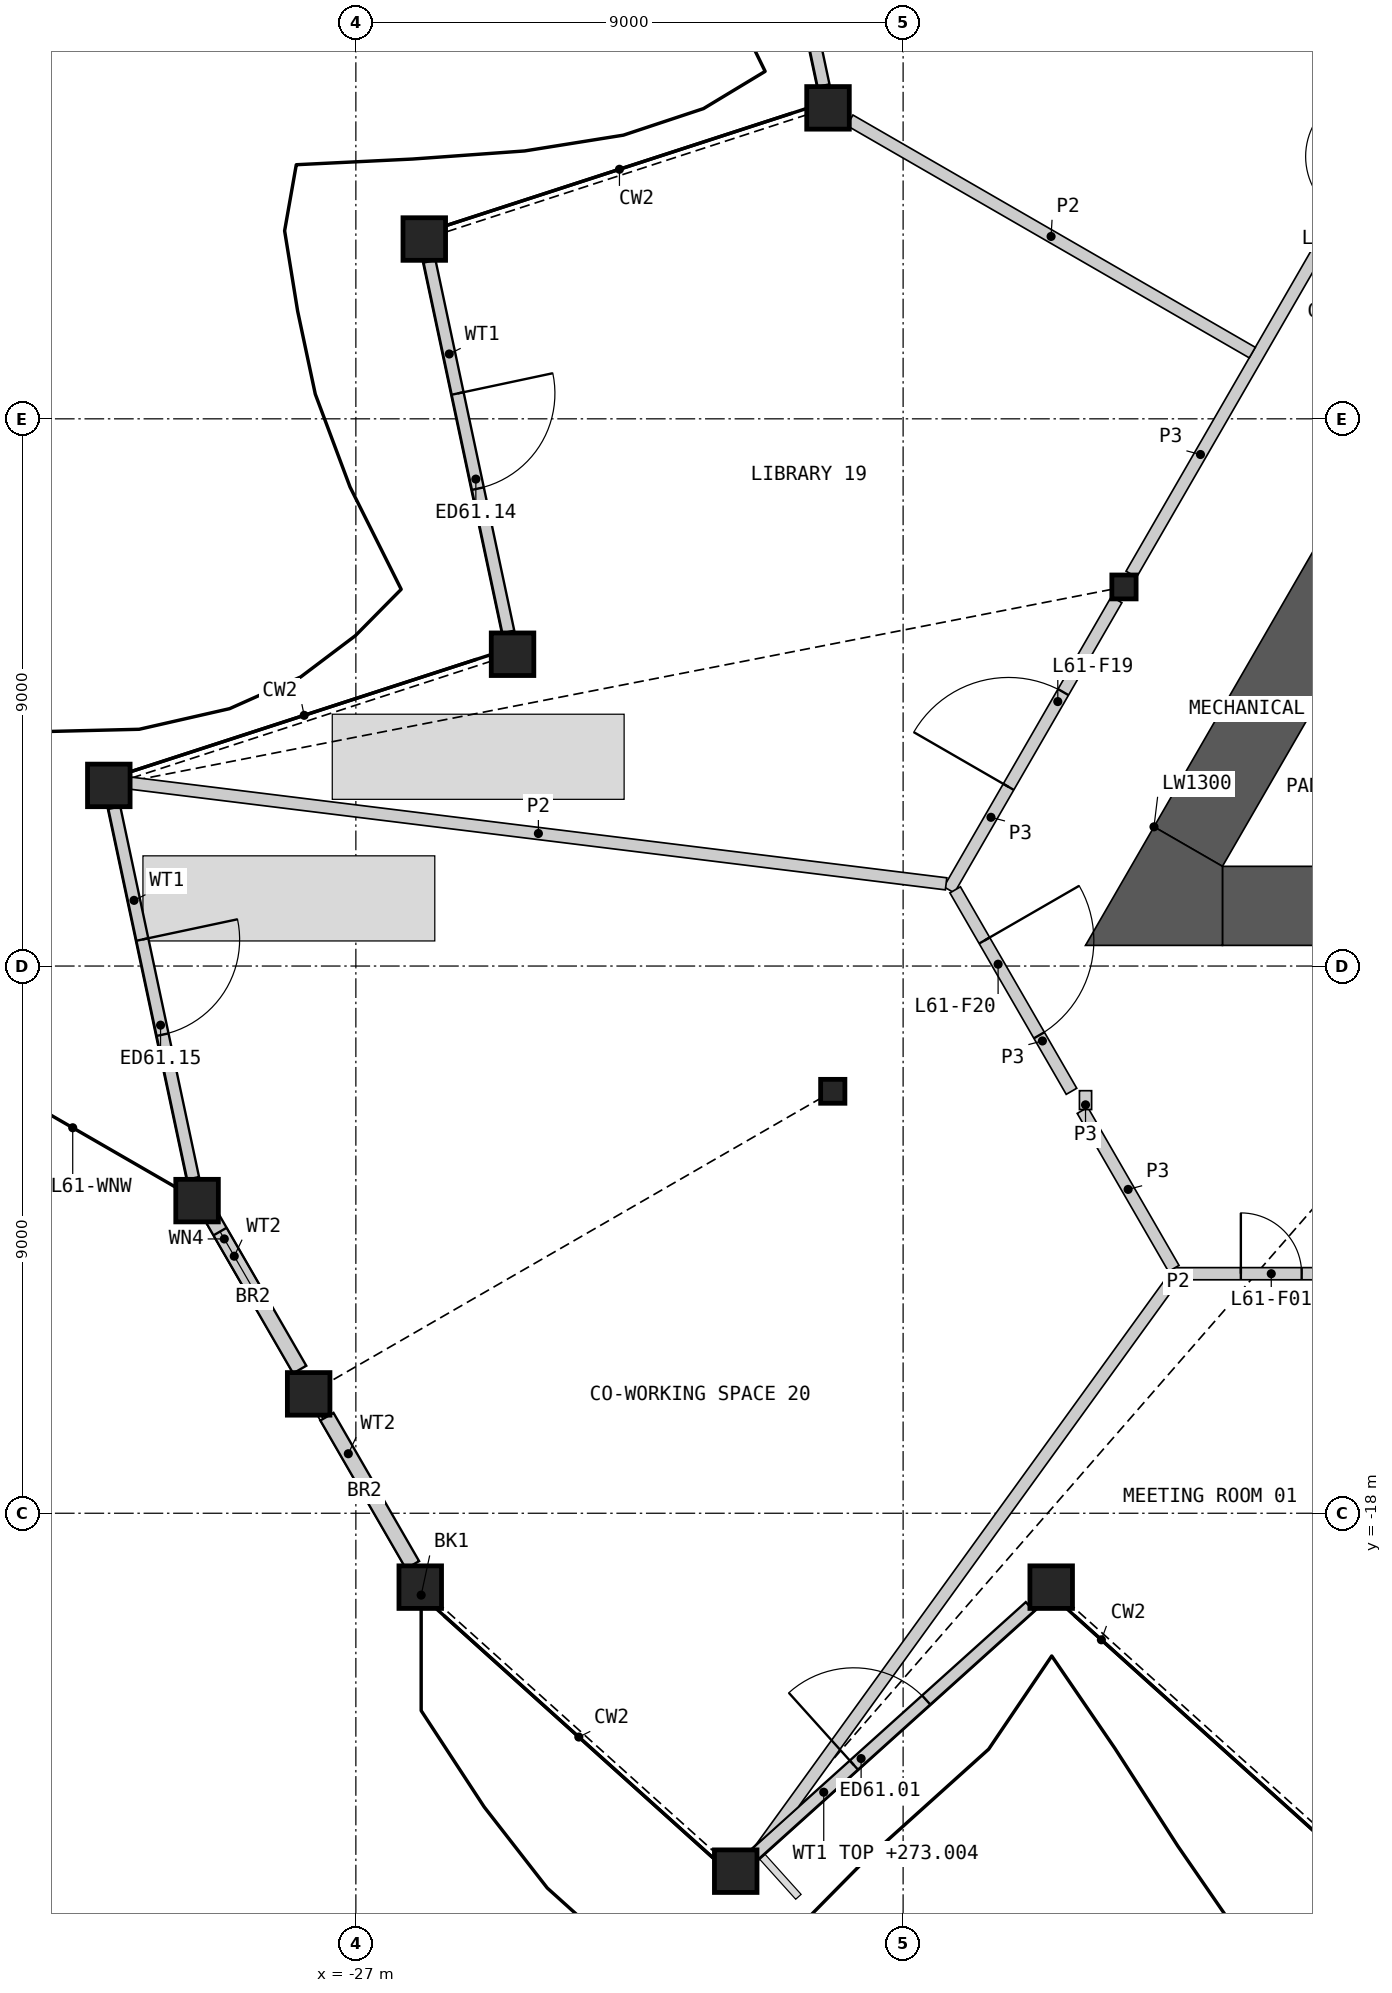
"""IFC4 building model, lengths in metres.
Left out: names, types, materials, properties, quantities, classifications, styles, units other than length and angle.
Written with IfcOpenShell. Run it as: python <this file> out.ifc"""

import sys

from ifc_helpers import new_model, si_unit, direction, frame, frame_2d, origin, origin_2d, place, context, subcontext, project, spatial, polyline, rectangle, hollow_rectangle, i_section, outline, extrude, element, fill, save


model = new_model("IFC4")
c1 = context("Model", 3, precision=1e-05, world=origin(), true_north=direction((0.0, 1.0)))
c2 = subcontext(c1, "Body", "Model", "MODEL_VIEW")
j1 = project(units=[si_unit("LENGTHUNIT", "METRE"), si_unit("PLANEANGLEUNIT", "RADIAN")], contexts=[c1])
p1 = place(None, origin())
s1 = spatial("IfcSite", under=j1, at=p1, CompositionType="ELEMENT")
p2 = place(p1, origin())
s2 = spatial("IfcBuilding", under=s1, at=p2, CompositionType="ELEMENT")
p3 = place(p2, frame((0.0, 0.0, 270.6)))
s3 = spatial("IfcBuildingStorey", under=s2, at=p3, CompositionType="ELEMENT", Elevation=270.6)
for number, where, z_axis, x_axis in (
    (1, (-25.941, -19.215, 0.0), (0.0, 0.0, 1.0), (1.0, 0.0, 0.0)),
    (2, (-20.753, -23.887, 0.0), (0.0, 0.0, 1.0), (1.0, 0.0, 0.0)),
    (3, (-15.565, -19.215, 0.0), (0.0, 0.0, 1.0), (1.0, 0.0, 0.0)),
    (4, (-19.235, 5.115, 0.0), (0.0, 0.0, 1.0), (1.0, 0.0, 0.0)),
    (5, (-25.875, 2.957, 0.0), (0.0, 0.0, 1.0), (1.0, 0.0, 0.0)),
    (6, (-24.423, -3.872, 0.0), (0.0, 0.0, 1.0), (1.0, 0.0, 0.0)),
    (7, (-31.063, -6.029, 0.0), (0.0, 0.0, 1.0), (1.0, 0.0, 0.0)),
    (8, (-29.612, -12.858, 0.0), (0.0, 0.0, 1.0), (1.0, 0.0, 0.0)),
    (9, (-27.776, -16.037, 0.0), (0.0, 0.0, 1.0), (1.0, 0.0, 0.0)),
):
    element("IfcColumn", number, at=place(p3, frame(where, z_axis=z_axis, x_axis=x_axis)), inside=s3, PredefinedType="COLUMN", context=c2, shape_type="SweptSolid", body=[
        extrude(hollow_rectangle(XDim=0.7, YDim=0.7, WallThickness=0.045, at=origin_2d()), origin(), (0.0, 0.0, 1.0), 3.6),
    ])
for number, where, z_axis, x_axis in (
    (10, (-14.368, -2.765, 0.0), (0.0, 0.0, 1.0), (1.0, 0.0, 0.0)),
    (11, (-19.157, -11.06, 0.0), (0.0, 0.0, 1.0), (1.0, 0.0, 0.0)),
):
    element("IfcColumn", number, at=place(p3, frame(where, z_axis=z_axis, x_axis=x_axis)), inside=s3, PredefinedType="COLUMN", context=c2, shape_type="SweptSolid", body=[
        extrude(i_section(OverallWidth=0.399, OverallDepth=0.393, WebThickness=0.023, FlangeThickness=0.037, at=origin_2d()), origin(), (0.0, 0.0, 1.0), 3.6),
    ])
p4 = place(p3, frame((-20.436, -23.606, 0.0), z_axis=(0.0, 0.0, 1.0), x_axis=(0.743162414049, 0.669111071755, 0.0)))
e12 = element("IfcWall", 12, at=p4, inside=s3, PredefinedType="SOLIDWALL", context=c2, shape_type="SweptSolid", body=[
    extrude(rectangle(XDim=6.083, YDim=0.2, at=frame_2d((3.042, 0.0))), origin(), (0.0, 0.0, 1.0), 2.404),
])
p5 = place(p4, frame((2.188, 0.0, 0.0)))
e13 = element("IfcOpeningElement", 13, at=p5, cuts=e12, PredefinedType="OPENING", context=c2, shape_type="SweptSolid", body=[
    extrude(rectangle(XDim=1.6, YDim=2.4, at=frame_2d((0.8, 1.2))), frame((0.0, 0.11, 0.0), z_axis=(0.0, -1.0, 0.0), x_axis=(1.0, 0.0, 0.0)), (0.0, 0.0, 1.0), 0.22),
])
p6 = place(p3, frame((-20.604, 11.577, 0.0), z_axis=(0.0, 0.0, 1.0), x_axis=(0.207907484076, -0.978148494895, 0.0)))
e14 = element("IfcWall", 14, at=p6, inside=s3, PredefinedType="SOLIDWALL", context=c2, shape_type="SweptSolid", body=[
    extrude(rectangle(XDim=6.232, YDim=0.2, at=frame_2d((3.116, 0.0))), origin(), (0.0, 0.0, 1.0), 2.701),
])
p7 = place(p6, frame((2.227, 0.0, 0.0)))
e15 = element("IfcOpeningElement", 15, at=p7, cuts=e14, PredefinedType="OPENING", context=c2, shape_type="SweptSolid", body=[
    extrude(rectangle(XDim=1.6, YDim=2.4, at=frame_2d((0.8, 1.2))), frame((0.0, 0.11, 0.0), z_axis=(0.0, -1.0, 0.0), x_axis=(1.0, 0.0, 0.0)), (0.0, 0.0, 1.0), 0.22),
])
p8 = place(p3, frame((-25.788, 2.591, 0.0), z_axis=(0.0, 0.0, 1.0), x_axis=(0.207907484076, -0.978148494895, 0.0)))
e16 = element("IfcWall", 16, at=p8, inside=s3, PredefinedType="SOLIDWALL", context=c2, shape_type="SweptSolid", body=[
    extrude(rectangle(XDim=6.232, YDim=0.2, at=frame_2d((3.116, 0.0))), origin(), (0.0, 0.0, 1.0), 2.701),
])
p9 = place(p8, frame((2.222, 0.0, 0.0)))
e17 = element("IfcOpeningElement", 17, at=p9, cuts=e16, PredefinedType="OPENING", context=c2, shape_type="SweptSolid", body=[
    extrude(rectangle(XDim=1.6, YDim=2.4, at=frame_2d((0.8, 1.2))), frame((0.0, 0.11, 0.0), z_axis=(0.0, -1.0, 0.0), x_axis=(1.0, 0.0, 0.0)), (0.0, 0.0, 1.0), 0.22),
])
p10 = place(p3, frame((-30.972, -6.396, 0.0), z_axis=(0.0, 0.0, 1.0), x_axis=(0.207907484076, -0.978148494895, 0.0)))
e18 = element("IfcWall", 18, at=p10, inside=s3, PredefinedType="SOLIDWALL", context=c2, shape_type="SweptSolid", body=[
    extrude(rectangle(XDim=6.232, YDim=0.2, at=frame_2d((3.116, 0.0))), origin(), (0.0, 0.0, 1.0), 2.701),
])
p11 = place(p10, frame((2.216, 0.0, 0.0)))
e19 = element("IfcOpeningElement", 19, at=p11, cuts=e18, PredefinedType="OPENING", context=c2, shape_type="SweptSolid", body=[
    extrude(rectangle(XDim=1.6, YDim=2.4, at=frame_2d((0.8, 1.2))), frame((0.0, 0.11, 0.0), z_axis=(0.0, -1.0, 0.0), x_axis=(1.0, 0.0, 0.0)), (0.0, 0.0, 1.0), 0.22),
])
p12 = place(p3, frame((-29.359, -13.151, 0.0), z_axis=(0.0, 0.0, 1.0), x_axis=(0.499989935246, -0.866031214595, 0.0)))
e20 = element("IfcWall", 20, at=p12, inside=s3, PredefinedType="SOLIDWALL", context=c2, shape_type="SweptSolid", body=[
    extrude(rectangle(XDim=2.871, YDim=0.25, at=frame_2d((1.435, 0.0))), origin(), (0.0, 0.0, 1.0), 2.701),
])
p13 = place(p12, frame((0.25, 0.0, 1.8)))
e21 = element("IfcOpeningElement", 21, at=p13, cuts=e20, PredefinedType="OPENING", context=c2, shape_type="SweptSolid", body=[
    extrude(rectangle(XDim=1.4, YDim=0.7, at=frame_2d((0.7, 0.35))), frame((0.0, 0.135, 0.0), z_axis=(0.0, -1.0, 0.0), x_axis=(1.0, 0.0, 0.0)), (0.0, 0.0, 1.0), 0.27),
])
p14 = place(p3, frame((-27.476, -16.412, 0.0), z_axis=(0.0, 0.0, 1.0), x_axis=(0.49996263964, -0.866046972724, 0.0)))
e22 = element("IfcWall", 22, at=p14, inside=s3, PredefinedType="SOLIDWALL", context=c2, shape_type="SweptSolid", body=[
    extrude(rectangle(XDim=2.816, YDim=0.25, at=frame_2d((1.408, 0.0))), origin(), (0.0, 0.0, 1.0), 2.701),
])
p15 = place(p3, frame((-12.748, -8.01, 0.0), z_axis=(0.0, 0.0, 1.0), x_axis=(1.0, 0.0, 0.0)))
e23 = element("IfcWall", 23, at=p15, inside=s3, PredefinedType="SHEAR", context=c2, shape_type="SweptSolid", body=[
    extrude(rectangle(XDim=4.26, YDim=1.3, at=frame_2d((2.13, 0.0))), origin(), (0.0, 0.0, 1.0), 3.25),
])
p16 = place(p3, frame((-10.338, -1.885, 0.0), z_axis=(0.0, 0.0, 1.0), x_axis=(-0.499975944838, -0.866039291593, 0.0)))
e24 = element("IfcWall", 24, at=p16, inside=s3, PredefinedType="SHEAR", context=c2, shape_type="SweptSolid", body=[
    extrude(rectangle(XDim=5.947, YDim=1.3, at=frame_2d((2.974, 0.0))), origin(), (0.0, 0.0, 1.0), 3.25),
])
p17 = place(p3, origin())
e25 = element("IfcWall", 25, at=p17, inside=s3, PredefinedType="SHEAR", context=c2, shape_type="SweptSolid", body=[
    extrude(outline(polyline([(-13.874, -6.71), (-12.748, -7.36), (-12.748, -8.66), (-15.0, -8.66), (-13.874, -6.71)])), origin(), (0.0, 0.0, 1.0), 3.25),
])
p18 = place(p3, frame((-13.599, -14.06, 0.0), z_axis=(0.0, 0.0, 1.0), x_axis=(1.0, 0.0, 0.0)))
e26 = element("IfcWall", 26, at=p18, inside=s3, PredefinedType="PARTITIONING", context=c2, shape_type="SweptSolid", body=[
    extrude(rectangle(XDim=27.198, YDim=0.2, at=frame_2d((13.599, 0.0))), origin(), (0.0, 0.0, 1.0), 3.25),
])
p19 = place(p18, frame((1.153, 0.0, 0.0)))
e27 = element("IfcOpeningElement", 27, at=p19, cuts=e26, PredefinedType="OPENING", context=c2, shape_type="SweptSolid", body=[
    extrude(rectangle(XDim=1.0, YDim=2.1, at=frame_2d((0.5, 1.05))), frame((0.0, 0.11, 0.0), z_axis=(0.0, -1.0, 0.0), x_axis=(1.0, 0.0, 0.0)), (0.0, 0.0, 1.0), 0.22),
])
p20 = place(p18, frame((7.478, 0.0, 0.0)))
e28 = element("IfcOpeningElement", 28, at=p20, cuts=e26, PredefinedType="OPENING", context=c2, shape_type="SweptSolid", body=[
    extrude(rectangle(XDim=1.8, YDim=2.1, at=frame_2d((0.9, 1.05))), frame((0.0, 0.11, 0.0), z_axis=(0.0, -1.0, 0.0), x_axis=(1.0, 0.0, 0.0)), (0.0, 0.0, 1.0), 0.22),
])
p21 = place(p18, frame((17.516, 0.0, 0.0)))
e29 = element("IfcOpeningElement", 29, at=p21, cuts=e26, PredefinedType="OPENING", context=c2, shape_type="SweptSolid", body=[
    extrude(rectangle(XDim=1.0, YDim=2.1, at=frame_2d((0.5, 1.05))), frame((0.0, 0.11, 0.0), z_axis=(0.0, -1.0, 0.0), x_axis=(1.0, 0.0, 0.0)), (0.0, 0.0, 1.0), 0.22),
])
p22 = place(p18, frame((22.036, 0.0, 0.0)))
e30 = element("IfcOpeningElement", 30, at=p22, cuts=e26, PredefinedType="OPENING", context=c2, shape_type="SweptSolid", body=[
    extrude(rectangle(XDim=1.8, YDim=2.1, at=frame_2d((0.9, 1.05))), frame((0.0, 0.11, 0.0), z_axis=(0.0, -1.0, 0.0), x_axis=(1.0, 0.0, 0.0)), (0.0, 0.0, 1.0), 0.22),
])
p23 = place(p3, frame((-14.247, -2.556, 0.0), z_axis=(0.0, 0.0, 1.0), x_axis=(0.49998193945, 0.866035830797, 0.0)))
e31 = element("IfcWall", 31, at=p23, inside=s3, PredefinedType="PARTITIONING", context=c2, shape_type="SweptSolid", body=[
    extrude(rectangle(XDim=9.094, YDim=0.2, at=frame_2d((4.547, 0.0))), origin(), (0.0, 0.0, 1.0), 3.25),
])
p24 = place(p23, frame((6.833, 0.0, 0.0)))
e32 = element("IfcOpeningElement", 32, at=p24, cuts=e31, PredefinedType="OPENING", context=c2, shape_type="SweptSolid", body=[
    extrude(rectangle(XDim=1.1, YDim=2.1, at=frame_2d((0.55, 1.05))), frame((0.0, 0.11, 0.0), z_axis=(0.0, -1.0, 0.0), x_axis=(1.0, 0.0, 0.0)), (0.0, 0.0, 1.0), 0.22),
])
p25 = place(p3, frame((-17.244, -7.747, 0.0), z_axis=(0.0, 0.0, 1.0), x_axis=(0.500017753321, 0.866015153657, 0.0)))
e33 = element("IfcWall", 33, at=p25, inside=s3, PredefinedType="PARTITIONING", context=c2, shape_type="SweptSolid", body=[
    extrude(rectangle(XDim=5.51, YDim=0.2, at=frame_2d((2.755, 0.0))), origin(), (0.0, 0.0, 1.0), 3.25),
])
p26 = place(p25, frame((1.956, 0.0, 0.0)))
e34 = element("IfcOpeningElement", 34, at=p26, cuts=e33, PredefinedType="OPENING", context=c2, shape_type="SweptSolid", body=[
    extrude(rectangle(XDim=1.8, YDim=2.1, at=frame_2d((0.9, 1.05))), frame((0.0, 0.11, 0.0), z_axis=(0.0, -1.0, 0.0), x_axis=(1.0, 0.0, 0.0)), (0.0, 0.0, 1.0), 0.22),
])
p27 = place(p3, frame((-17.144, -7.747, 0.0), z_axis=(0.0, 0.0, 1.0), x_axis=(0.499961815444, -0.866047448526, 0.0)))
e35 = element("IfcWall", 35, at=p27, inside=s3, PredefinedType="PARTITIONING", context=c2, shape_type="SweptSolid", body=[
    extrude(rectangle(XDim=3.826, YDim=0.2, at=frame_2d((1.913, 0.0))), origin(), (0.0, 0.0, 1.0), 3.25),
])
p28 = place(p27, frame((0.962, 0.0, 0.0)))
e36 = element("IfcOpeningElement", 36, at=p28, cuts=e35, PredefinedType="OPENING", context=c2, shape_type="SweptSolid", body=[
    extrude(rectangle(XDim=1.8, YDim=2.1, at=frame_2d((0.9, 1.05))), frame((0.0, 0.11, 0.0), z_axis=(0.0, -1.0, 0.0), x_axis=(1.0, 0.0, 0.0)), (0.0, 0.0, 1.0), 0.22),
])
p29 = place(p3, frame((-15.05, -11.374, 0.0), z_axis=(0.0, 0.0, 1.0), x_axis=(0.500048608389, -0.865997337899, 0.0)))
e37 = element("IfcWall", 37, at=p29, inside=s3, PredefinedType="PARTITIONING", context=c2, shape_type="SweptSolid", body=[
    extrude(rectangle(XDim=3.002, YDim=0.2, at=frame_2d((1.501, 0.0))), origin(), (0.0, 0.0, 1.0), 3.25),
])
p30 = place(p3, frame((-15.0, -11.36, 0.0), z_axis=(0.0, 0.0, 1.0), x_axis=(0.0, 1.0, 0.0)))
e38 = element("IfcWall", 38, at=p30, inside=s3, PredefinedType="PARTITIONING", context=c2, shape_type="SweptSolid", body=[
    extrude(rectangle(XDim=0.31, YDim=0.2, at=frame_2d((0.155, 0.0))), origin(), (0.0, 0.0, 1.0), 3.25),
])
p31 = place(p3, frame((-30.703, -5.992, 0.0), z_axis=(0.0, 0.0, 1.0), x_axis=(0.992463280008, -0.122542391993, 0.0)))
e39 = element("IfcWall", 39, at=p31, inside=s3, PredefinedType="PARTITIONING", context=c2, shape_type="SweptSolid", body=[
    extrude(rectangle(XDim=13.512, YDim=0.2, at=frame_2d((6.756, 0.0))), origin(), (0.0, 0.0, 1.0), 2.404),
])
p32 = place(p3, origin())
e40 = element("IfcWall", 40, at=p32, inside=s3, PredefinedType="PARTITIONING", context=c2, shape_type="SweptSolid", body=[
    extrude(outline(polyline([(-13.476, -14.2), (-19.723, -22.83), (-20.432, -23.468), (-13.638, -14.083), (-13.476, -14.2)])), origin(), (0.0, 0.0, 1.0), 2.404),
])
p33 = place(p3, frame((-18.875, 4.91, 0.0), z_axis=(0.0, 0.0, 1.0), x_axis=(0.866018509426, -0.50001194119, 0.0)))
e41 = element("IfcWall", 41, at=p33, inside=s3, PredefinedType="PARTITIONING", context=c2, shape_type="SweptSolid", body=[
    extrude(rectangle(XDim=7.641, YDim=0.2, at=frame_2d((3.82, 0.0))), origin(), (0.0, 0.0, 1.0), 2.404),
])
p34 = place(p5, origin())
e42 = element("IfcDoor", 42, at=p34, inside=s3, OperationType="DOUBLE_DOOR_SINGLE_SWING", PredefinedType="DOOR", context=c2, shape_type="SweptSolid", body=[
    extrude(rectangle(XDim=1.6, YDim=2.4, at=frame_2d((0.8, 1.2))), frame((0.0, 0.025, 0.0), z_axis=(0.0, -1.0, 0.0), x_axis=(1.0, 0.0, 0.0)), (0.0, 0.0, 1.0), 0.05),
])
fill(e13, e42)
p35 = place(p9, origin())
e43 = element("IfcDoor", 43, at=p35, inside=s3, OperationType="DOUBLE_DOOR_SINGLE_SWING", PredefinedType="DOOR", context=c2, shape_type="SweptSolid", body=[
    extrude(rectangle(XDim=1.6, YDim=2.4, at=frame_2d((0.8, 1.2))), frame((0.0, 0.025, 0.0), z_axis=(0.0, -1.0, 0.0), x_axis=(1.0, 0.0, 0.0)), (0.0, 0.0, 1.0), 0.05),
])
fill(e17, e43)
p36 = place(p11, origin())
e44 = element("IfcDoor", 44, at=p36, inside=s3, OperationType="DOUBLE_DOOR_SINGLE_SWING", PredefinedType="DOOR", context=c2, shape_type="SweptSolid", body=[
    extrude(rectangle(XDim=1.6, YDim=2.4, at=frame_2d((0.8, 1.2))), frame((0.0, 0.025, 0.0), z_axis=(0.0, -1.0, 0.0), x_axis=(1.0, 0.0, 0.0)), (0.0, 0.0, 1.0), 0.05),
])
fill(e19, e44)
p37 = place(p13, origin())
e45 = element("IfcWindow", 45, at=p37, inside=s3, PartitioningType="SINGLE_PANEL", PredefinedType="WINDOW", context=c2, shape_type="SweptSolid", body=[
    extrude(rectangle(XDim=1.4, YDim=0.7, at=frame_2d((0.7, 0.35))), frame((0.0, 0.03, 0.0), z_axis=(0.0, -1.0, 0.0), x_axis=(1.0, 0.0, 0.0)), (0.0, 0.0, 1.0), 0.06),
])
fill(e21, e45)
p38 = place(p19, origin())
e46 = element("IfcDoor", 46, at=p38, inside=s3, OperationType="SINGLE_SWING_LEFT", PredefinedType="DOOR", context=c2, shape_type="SweptSolid", body=[
    extrude(rectangle(XDim=1.0, YDim=2.1, at=frame_2d((0.5, 1.05))), frame((0.0, 0.025, 0.0), z_axis=(0.0, -1.0, 0.0), x_axis=(1.0, 0.0, 0.0)), (0.0, 0.0, 1.0), 0.05),
])
fill(e27, e46)
p39 = place(p26, origin())
e47 = element("IfcDoor", 47, at=p39, inside=s3, OperationType="DOUBLE_DOOR_SINGLE_SWING", PredefinedType="DOOR", context=c2, shape_type="SweptSolid", body=[
    extrude(rectangle(XDim=1.8, YDim=2.1, at=frame_2d((0.9, 1.05))), frame((0.0, 0.025, 0.0), z_axis=(0.0, -1.0, 0.0), x_axis=(1.0, 0.0, 0.0)), (0.0, 0.0, 1.0), 0.05),
])
fill(e34, e47)
p40 = place(p28, origin())
e48 = element("IfcDoor", 48, at=p40, inside=s3, OperationType="DOUBLE_DOOR_SINGLE_SWING", PredefinedType="DOOR", context=c2, shape_type="SweptSolid", body=[
    extrude(rectangle(XDim=1.8, YDim=2.1, at=frame_2d((0.9, 1.05))), frame((0.0, 0.025, 0.0), z_axis=(0.0, -1.0, 0.0), x_axis=(1.0, 0.0, 0.0)), (0.0, 0.0, 1.0), 0.05),
])
fill(e36, e48)
save(model, sys.argv[1])
